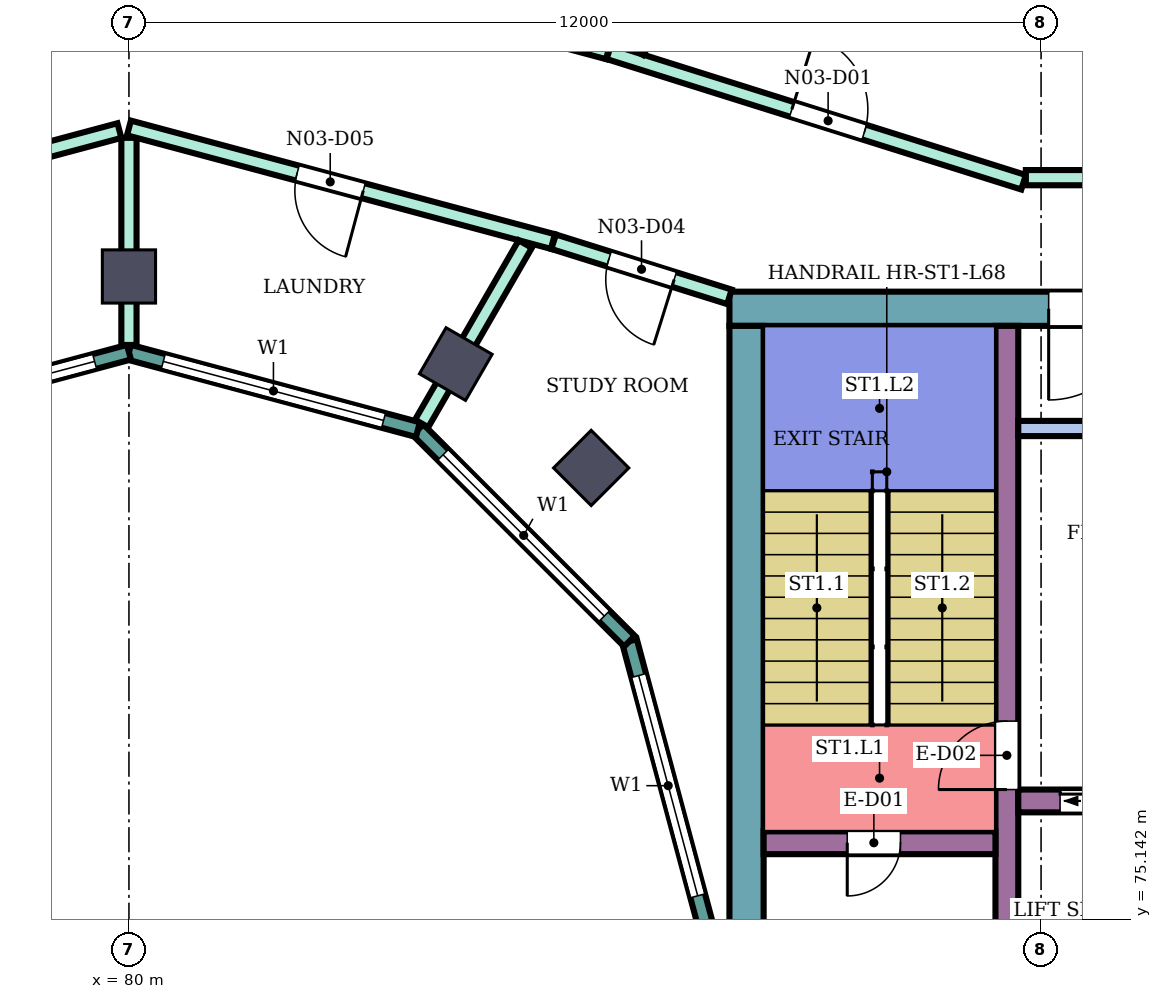
"""IFC4 building model, lengths in metres.
Left out: names, types, materials, properties, quantities, classifications, styles, units other than length and angle.
Written with IfcOpenShell. Run it as: python <this file> out.ifc"""

import sys

from ifc_helpers import new_model, si_unit, direction, frame, frame_2d, origin, origin_2d, place, context, subcontext, project, spatial, rectangle, extrude, element, fill, save


model = new_model("IFC4")
c1 = context("Model", 3, precision=1e-05, world=origin(), true_north=direction((0.0, 1.0)))
c2 = subcontext(c1, "Body", "Model", "MODEL_VIEW")
j1 = project(units=[si_unit("LENGTHUNIT", "METRE"), si_unit("PLANEANGLEUNIT", "RADIAN")], contexts=[c1])
p1 = place(None, origin())
s1 = spatial("IfcSite", under=j1, at=p1, CompositionType="ELEMENT")
p2 = place(p1, origin())
s2 = spatial("IfcBuilding", under=s1, at=p2, CompositionType="ELEMENT")
p3 = place(p2, frame((0.0, 0.0, 296.7)))
s3 = spatial("IfcBuildingStorey", under=s2, at=p3, CompositionType="ELEMENT", Elevation=296.7)
for number, where, z_axis, x_axis in (
    (1, (86.081, 81.081, 0.0), (0.0, 0.0, 1.0), (0.707, 0.707, 0.0)),
    (2, (84.3, 82.448, 0.0), (0.0, 0.0, 1.0), (0.5, 0.866, 0.0)),
    (3, (80.0, 83.6, 0.0), (0.0, 0.0, 1.0), (0.0, 1.0, 0.0)),
):
    element("IfcColumn", number, at=place(p3, frame(where, z_axis=z_axis, x_axis=x_axis)), inside=s3, PredefinedType="COLUMN", context=c2, shape_type="SweptSolid", body=[
        extrude(rectangle(XDim=0.7, YDim=0.7, at=origin_2d()), origin(), (0.0, 0.0, 1.0), 4.2),
    ])
p4 = place(p3, frame((87.9, 83.175, 0.0), z_axis=(0.0, 0.0, 1.0), x_axis=(1.0, 0.0, 0.0)))
e4 = element("IfcWall", 4, at=p4, inside=s3, PredefinedType="SHEAR", context=c2, shape_type="SweptSolid", body=[
    extrude(rectangle(XDim=12.0, YDim=0.45, at=frame_2d((6.0, 0.0))), origin(), (0.0, 0.0, 1.0), 3.88),
])
p5 = place(p4, frame((4.2, 0.0, 0.0)))
e5 = element("IfcOpeningElement", 5, at=p5, cuts=e4, PredefinedType="OPENING", context=c2, shape_type="SweptSolid", body=[
    extrude(rectangle(XDim=2.4, YDim=2.4, at=frame_2d((1.2, 1.2))), frame((0.0, 0.235, 0.0), z_axis=(0.0, -1.0, 0.0), x_axis=(1.0, 0.0, 0.0)), (0.0, 0.0, 1.0), 0.47),
])
p6 = place(p3, frame((88.125, 75.0, 0.0), z_axis=(0.0, 0.0, 1.0), x_axis=(0.0, 1.0, 0.0)))
e6 = element("IfcWall", 6, at=p6, inside=s3, PredefinedType="SHEAR", context=c2, shape_type="SweptSolid", body=[
    extrude(rectangle(XDim=7.95, YDim=0.45, at=frame_2d((3.975, 0.0))), origin(), (0.0, 0.0, 1.0), 3.88),
])
p7 = place(p3, frame((91.55, 75.0, 0.0), z_axis=(0.0, 0.0, 1.0), x_axis=(0.0, 1.0, 0.0)))
e7 = element("IfcWall", 7, at=p7, inside=s3, PredefinedType="SHEAR", context=c2, shape_type="SweptSolid", body=[
    extrude(rectangle(XDim=7.95, YDim=0.3, at=frame_2d((3.975, 0.0))), origin(), (0.0, 0.0, 1.0), 3.88),
])
p8 = place(p7, frame((1.85, 0.0, 0.0)))
e8 = element("IfcOpeningElement", 8, at=p8, cuts=e7, PredefinedType="OPENING", context=c2, shape_type="SweptSolid", body=[
    extrude(rectangle(XDim=0.9, YDim=2.1, at=frame_2d((0.45, 1.05))), frame((0.0, 0.16, 0.0), z_axis=(0.0, -1.0, 0.0), x_axis=(1.0, 0.0, 0.0)), (0.0, 0.0, 1.0), 0.32),
])
p9 = place(p3, frame((88.35, 76.15, 0.0), z_axis=(0.0, 0.0, 1.0), x_axis=(1.0, 0.0, 0.0)))
e9 = element("IfcWall", 9, at=p9, inside=s3, PredefinedType="SHEAR", context=c2, shape_type="SweptSolid", body=[
    extrude(rectangle(XDim=3.05, YDim=0.3, at=frame_2d((1.525, 0.0))), origin(), (0.0, 0.0, 1.0), 3.88),
])
p10 = place(p9, frame((1.1, 0.0, 0.0)))
e10 = element("IfcOpeningElement", 10, at=p10, cuts=e9, PredefinedType="OPENING", context=c2, shape_type="SweptSolid", body=[
    extrude(rectangle(XDim=0.7, YDim=2.0, at=frame_2d((0.35, 1.0))), frame((0.0, 0.16, 0.0), z_axis=(0.0, -1.0, 0.0), x_axis=(1.0, 0.0, 0.0)), (0.0, 0.0, 1.0), 0.32),
])
p11 = place(p3, frame((91.7, 76.7, 0.0), z_axis=(0.0, 0.0, 1.0), x_axis=(1.0, 0.0, 0.0)))
e11 = element("IfcWall", 11, at=p11, inside=s3, PredefinedType="SHEAR", context=c2, shape_type="SweptSolid", body=[
    extrude(rectangle(XDim=7.75, YDim=0.3, at=frame_2d((3.875, 0.0))), origin(), (0.0, 0.0, 1.0), 3.88),
])
p12 = place(p11, frame((0.55, 0.0, 0.0)))
e12 = element("IfcOpeningElement", 12, at=p12, cuts=e11, PredefinedType="OPENING", context=c2, shape_type="SweptSolid", body=[
    extrude(rectangle(XDim=1.1, YDim=2.1, at=frame_2d((0.55, 1.05))), frame((0.0, 0.16, 0.0), z_axis=(0.0, -1.0, 0.0), x_axis=(1.0, 0.0, 0.0)), (0.0, 0.0, 1.0), 0.32),
])
p13 = place(p11, frame((3.0, 0.0, 0.0)))
e13 = element("IfcOpeningElement", 13, at=p13, cuts=e11, PredefinedType="OPENING", context=c2, shape_type="SweptSolid", body=[
    extrude(rectangle(XDim=1.2, YDim=2.1, at=frame_2d((0.6, 1.05))), frame((0.0, 0.16, 0.0), z_axis=(0.0, -1.0, 0.0), x_axis=(1.0, 0.0, 0.0)), (0.0, 0.0, 1.0), 0.32),
])
p14 = place(p11, frame((5.5, 0.0, 0.0)))
e14 = element("IfcOpeningElement", 14, at=p14, cuts=e11, PredefinedType="OPENING", context=c2, shape_type="SweptSolid", body=[
    extrude(rectangle(XDim=1.2, YDim=2.1, at=frame_2d((0.6, 1.05))), frame((0.0, 0.16, 0.0), z_axis=(0.0, -1.0, 0.0), x_axis=(1.0, 0.0, 0.0)), (0.0, 0.0, 1.0), 0.32),
])
p15 = place(p3, frame((91.7, 81.6, 0.0), z_axis=(0.0, 0.0, 1.0), x_axis=(1.0, 0.0, 0.0)))
e15 = element("IfcWall", 15, at=p15, inside=s3, PredefinedType="SHEAR", context=c2, shape_type="SweptSolid", body=[
    extrude(rectangle(XDim=4.15, YDim=0.2, at=frame_2d((2.075, 0.0))), origin(), (0.0, 0.0, 1.0), 3.88),
])
p16 = place(p3, frame((87.604, 75.0, 0.0), z_axis=(0.0, 0.0, 1.0), x_axis=(-0.258789828301, 0.965933654434, 0.0)))
e16 = element("IfcWall", 16, at=p16, inside=s3, PredefinedType="NOTDEFINED", context=c2, shape_type="SweptSolid", body=[
    extrude(rectangle(XDim=3.936, YDim=0.2, at=frame_2d((1.968, 0.0))), origin(), (0.0, 0.0, 1.0), 4.2),
])
p17 = place(p16, frame((0.468, 0.0, 0.9)))
e17 = element("IfcOpeningElement", 17, at=p17, cuts=e16, PredefinedType="OPENING", context=c2, shape_type="SweptSolid", body=[
    extrude(rectangle(XDim=3.0, YDim=2.3, at=frame_2d((1.5, 1.15))), frame((0.0, 0.11, 0.0), z_axis=(0.0, -1.0, 0.0), x_axis=(1.0, 0.0, 0.0)), (0.0, 0.0, 1.0), 0.22),
])
p18 = place(p3, frame((86.585, 78.802, 0.0), z_axis=(0.0, 0.0, 1.0), x_axis=(-0.707106781187, 0.707106781187, 0.0)))
e18 = element("IfcWall", 18, at=p18, inside=s3, PredefinedType="NOTDEFINED", context=c2, shape_type="SweptSolid", body=[
    extrude(rectangle(XDim=3.936, YDim=0.2, at=frame_2d((1.968, 0.0))), origin(), (0.0, 0.0, 1.0), 4.2),
])
p19 = place(p18, frame((0.468, 0.0, 0.9)))
e19 = element("IfcOpeningElement", 19, at=p19, cuts=e18, PredefinedType="OPENING", context=c2, shape_type="SweptSolid", body=[
    extrude(rectangle(XDim=3.0, YDim=2.3, at=frame_2d((1.5, 1.15))), frame((0.0, 0.11, 0.0), z_axis=(0.0, -1.0, 0.0), x_axis=(1.0, 0.0, 0.0)), (0.0, 0.0, 1.0), 0.22),
])
p20 = place(p3, frame((83.802, 81.585, 0.0), z_axis=(0.0, 0.0, 1.0), x_axis=(-0.965933654434, 0.258789828301, 0.0)))
e20 = element("IfcWall", 20, at=p20, inside=s3, PredefinedType="NOTDEFINED", context=c2, shape_type="SweptSolid", body=[
    extrude(rectangle(XDim=3.936, YDim=0.2, at=frame_2d((1.968, 0.0))), origin(), (0.0, 0.0, 1.0), 4.2),
])
p21 = place(p20, frame((0.468, 0.0, 0.9)))
e21 = element("IfcOpeningElement", 21, at=p21, cuts=e20, PredefinedType="OPENING", context=c2, shape_type="SweptSolid", body=[
    extrude(rectangle(XDim=3.0, YDim=2.3, at=frame_2d((1.5, 1.15))), frame((0.0, 0.11, 0.0), z_axis=(0.0, -1.0, 0.0), x_axis=(1.0, 0.0, 0.0)), (0.0, 0.0, 1.0), 0.22),
])
p22 = place(p3, frame((80.0, 82.604, 0.0), z_axis=(0.0, 0.0, 1.0), x_axis=(-0.965933654434, -0.258789828301, 0.0)))
e22 = element("IfcWall", 22, at=p22, inside=s3, PredefinedType="NOTDEFINED", context=c2, shape_type="SweptSolid", body=[
    extrude(rectangle(XDim=3.936, YDim=0.2, at=frame_2d((1.968, 0.0))), origin(), (0.0, 0.0, 1.0), 4.2),
])
p23 = place(p22, frame((0.468, 0.0, 0.9)))
e23 = element("IfcOpeningElement", 23, at=p23, cuts=e22, PredefinedType="OPENING", context=c2, shape_type="SweptSolid", body=[
    extrude(rectangle(XDim=3.0, YDim=2.3, at=frame_2d((1.5, 1.15))), frame((0.0, 0.11, 0.0), z_axis=(0.0, -1.0, 0.0), x_axis=(1.0, 0.0, 0.0)), (0.0, 0.0, 1.0), 0.22),
])
p24 = place(p3, frame((74.413, 84.057, 0.0), z_axis=(0.0, 0.0, 1.0), x_axis=(0.965972135939, 0.258646153246, 0.0)))
e24 = element("IfcWall", 24, at=p24, inside=s3, PredefinedType="PARTITIONING", context=c2, shape_type="SweptSolid", body=[
    extrude(rectangle(XDim=5.654, YDim=0.2, at=frame_2d((2.827, 0.0))), origin(), (0.0, 0.0, 1.0), 3.75),
])
p25 = place(p24, frame((2.593, 0.0, 0.0)))
e25 = element("IfcOpeningElement", 25, at=p25, cuts=e24, PredefinedType="OPENING", context=c2, shape_type="SweptSolid", body=[
    extrude(rectangle(XDim=0.9, YDim=2.1, at=frame_2d((0.45, 1.05))), frame((0.0, 0.11, 0.0), z_axis=(0.0, -1.0, 0.0), x_axis=(1.0, 0.0, 0.0)), (0.0, 0.0, 1.0), 0.22),
])
p26 = place(p3, frame((80.0, 82.699, 0.0), z_axis=(0.0, 0.0, 1.0), x_axis=(0.0, 1.0, 0.0)))
e26 = element("IfcWall", 26, at=p26, inside=s3, PredefinedType="PARTITIONING", context=c2, shape_type="SweptSolid", body=[
    extrude(rectangle(XDim=2.725, YDim=0.2, at=frame_2d((1.363, 0.0))), origin(), (0.0, 0.0, 1.0), 3.75),
])
p27 = place(p3, frame((80.0, 85.554, 0.0), z_axis=(0.0, 0.0, 1.0), x_axis=(0.965928989968, -0.258807237802, 0.0)))
e27 = element("IfcWall", 27, at=p27, inside=s3, PredefinedType="PARTITIONING", context=c2, shape_type="SweptSolid", body=[
    extrude(rectangle(XDim=5.774, YDim=0.2, at=frame_2d((2.887, 0.0))), origin(), (0.0, 0.0, 1.0), 3.75),
])
p28 = place(p27, frame((2.292, 0.0, 0.0)))
e28 = element("IfcOpeningElement", 28, at=p28, cuts=e27, PredefinedType="OPENING", context=c2, shape_type="SweptSolid", body=[
    extrude(rectangle(XDim=0.9, YDim=2.1, at=frame_2d((0.45, 1.05))), frame((0.0, 0.11, 0.0), z_axis=(0.0, -1.0, 0.0), x_axis=(1.0, 0.0, 0.0)), (0.0, 0.0, 1.0), 0.22),
])
p29 = place(p3, frame((80.0, 88.246, 0.0), z_axis=(0.0, 0.0, 1.0), x_axis=(0.965856994925, -0.259075790752, 0.0)))
e29 = element("IfcWall", 29, at=p29, inside=s3, PredefinedType="PARTITIONING", context=c2, shape_type="SweptSolid", body=[
    extrude(rectangle(XDim=6.526, YDim=0.2, at=frame_2d((3.263, 0.0))), origin(), (0.0, 0.0, 1.0), 3.75),
])
p30 = place(p29, frame((2.768, 0.0, 0.0)))
e30 = element("IfcOpeningElement", 30, at=p30, cuts=e29, PredefinedType="OPENING", context=c2, shape_type="SweptSolid", body=[
    extrude(rectangle(XDim=1.0, YDim=2.1, at=frame_2d((0.5, 1.05))), frame((0.0, 0.11, 0.0), z_axis=(0.0, -1.0, 0.0), x_axis=(1.0, 0.0, 0.0)), (0.0, 0.0, 1.0), 0.22),
])
p31 = place(p3, frame((83.851, 81.666, 0.0), z_axis=(0.0, 0.0, 1.0), x_axis=(0.500146274735, 0.865940935554, 0.0)))
e31 = element("IfcWall", 31, at=p31, inside=s3, PredefinedType="PARTITIONING", context=c2, shape_type="SweptSolid", body=[
    extrude(rectangle(XDim=2.726, YDim=0.2, at=frame_2d((1.363, 0.0))), origin(), (0.0, 0.0, 1.0), 3.75),
])
p32 = place(p3, frame((85.587, 84.057, 0.0), z_axis=(0.0, 0.0, 1.0), x_axis=(0.954239513179, -0.299043393987, 0.0)))
e32 = element("IfcWall", 32, at=p32, inside=s3, PredefinedType="PARTITIONING", context=c2, shape_type="SweptSolid", body=[
    extrude(rectangle(XDim=2.424, YDim=0.2, at=frame_2d((1.212, 0.0))), origin(), (0.0, 0.0, 1.0), 3.75),
])
p33 = place(p32, frame((0.762, 0.0, 0.0)))
e33 = element("IfcOpeningElement", 33, at=p33, cuts=e32, PredefinedType="OPENING", context=c2, shape_type="SweptSolid", body=[
    extrude(rectangle(XDim=0.9, YDim=2.1, at=frame_2d((0.45, 1.05))), frame((0.0, 0.11, 0.0), z_axis=(0.0, -1.0, 0.0), x_axis=(1.0, 0.0, 0.0)), (0.0, 0.0, 1.0), 0.22),
])
p34 = place(p3, frame((86.314, 86.556, 0.0), z_axis=(0.0, 0.0, 1.0), x_axis=(0.953912400139, -0.300085209334, 0.0)))
e34 = element("IfcWall", 34, at=p34, inside=s3, PredefinedType="PARTITIONING", context=c2, shape_type="SweptSolid", body=[
    extrude(rectangle(XDim=5.719, YDim=0.2, at=frame_2d((2.86, 0.0))), origin(), (0.0, 0.0, 1.0), 3.75),
])
p35 = place(p34, frame((2.524, 0.0, 0.0)))
e35 = element("IfcOpeningElement", 35, at=p35, cuts=e34, PredefinedType="OPENING", context=c2, shape_type="SweptSolid", body=[
    extrude(rectangle(XDim=1.0, YDim=2.1, at=frame_2d((0.5, 1.05))), frame((0.0, 0.11, 0.0), z_axis=(0.0, -1.0, 0.0), x_axis=(1.0, 0.0, 0.0)), (0.0, 0.0, 1.0), 0.22),
])
p36 = place(p3, frame((86.679, 86.563, 0.0), z_axis=(0.0, 0.0, 1.0), x_axis=(0.500152516677, 0.865937330331, 0.0)))
e36 = element("IfcWall", 36, at=p36, inside=s3, PredefinedType="PARTITIONING", context=c2, shape_type="SweptSolid", body=[
    extrude(rectangle(XDim=8.943, YDim=0.2, at=frame_2d((4.472, 0.0))), origin(), (0.0, 0.0, 1.0), 3.75),
])
p37 = place(p3, frame((91.8, 84.9, 0.0), z_axis=(0.0, 0.0, 1.0), x_axis=(1.0, 0.0, 0.0)))
e37 = element("IfcWall", 37, at=p37, inside=s3, PredefinedType="PARTITIONING", context=c2, shape_type="SweptSolid", body=[
    extrude(rectangle(XDim=2.9, YDim=0.2, at=frame_2d((1.45, 0.0))), origin(), (0.0, 0.0, 1.0), 3.75),
])
p38 = place(p17, origin())
e38 = element("IfcWindow", 38, at=p38, inside=s3, PartitioningType="SINGLE_PANEL", PredefinedType="WINDOW", context=c2, shape_type="SweptSolid", body=[
    extrude(rectangle(XDim=3.0, YDim=2.3, at=frame_2d((1.5, 1.15))), frame((0.0, 0.03, 0.0), z_axis=(0.0, -1.0, 0.0), x_axis=(1.0, 0.0, 0.0)), (0.0, 0.0, 1.0), 0.06),
])
fill(e17, e38)
p39 = place(p19, origin())
e39 = element("IfcWindow", 39, at=p39, inside=s3, PartitioningType="SINGLE_PANEL", PredefinedType="WINDOW", context=c2, shape_type="SweptSolid", body=[
    extrude(rectangle(XDim=3.0, YDim=2.3, at=frame_2d((1.5, 1.15))), frame((0.0, 0.03, 0.0), z_axis=(0.0, -1.0, 0.0), x_axis=(1.0, 0.0, 0.0)), (0.0, 0.0, 1.0), 0.06),
])
fill(e19, e39)
p40 = place(p21, origin())
e40 = element("IfcWindow", 40, at=p40, inside=s3, PartitioningType="SINGLE_PANEL", PredefinedType="WINDOW", context=c2, shape_type="SweptSolid", body=[
    extrude(rectangle(XDim=3.0, YDim=2.3, at=frame_2d((1.5, 1.15))), frame((0.0, 0.03, 0.0), z_axis=(0.0, -1.0, 0.0), x_axis=(1.0, 0.0, 0.0)), (0.0, 0.0, 1.0), 0.06),
])
fill(e21, e40)
p41 = place(p23, origin())
e41 = element("IfcWindow", 41, at=p41, inside=s3, PartitioningType="SINGLE_PANEL", PredefinedType="WINDOW", context=c2, shape_type="SweptSolid", body=[
    extrude(rectangle(XDim=3.0, YDim=2.3, at=frame_2d((1.5, 1.15))), frame((0.0, 0.03, 0.0), z_axis=(0.0, -1.0, 0.0), x_axis=(1.0, 0.0, 0.0)), (0.0, 0.0, 1.0), 0.06),
])
fill(e23, e41)
p42 = place(p35, origin())
e42 = element("IfcDoor", 42, at=p42, inside=s3, OperationType="SINGLE_SWING_LEFT", PredefinedType="DOOR", context=c2, shape_type="SweptSolid", body=[
    extrude(rectangle(XDim=1.0, YDim=2.1, at=frame_2d((0.5, 1.05))), frame((0.0, 0.025, 0.0), z_axis=(0.0, -1.0, 0.0), x_axis=(1.0, 0.0, 0.0)), (0.0, 0.0, 1.0), 0.05),
])
fill(e35, e42)
p43 = place(p33, frame((0.9, 0.0, 0.0), z_axis=(0.0, 0.0, 1.0), x_axis=(-1.0, 0.0, 0.0)))
e43 = element("IfcDoor", 43, at=p43, inside=s3, OperationType="SINGLE_SWING_LEFT", PredefinedType="DOOR", context=c2, shape_type="SweptSolid", body=[
    extrude(rectangle(XDim=0.9, YDim=2.1, at=frame_2d((0.45, 1.05))), frame((0.0, 0.025, 0.0), z_axis=(0.0, -1.0, 0.0), x_axis=(1.0, 0.0, 0.0)), (0.0, 0.0, 1.0), 0.05),
])
fill(e33, e43)
p44 = place(p28, frame((0.9, 0.0, 0.0), z_axis=(0.0, 0.0, 1.0), x_axis=(-1.0, 0.0, 0.0)))
e44 = element("IfcDoor", 44, at=p44, inside=s3, OperationType="SINGLE_SWING_LEFT", PredefinedType="DOOR", context=c2, shape_type="SweptSolid", body=[
    extrude(rectangle(XDim=0.9, YDim=2.1, at=frame_2d((0.45, 1.05))), frame((0.0, 0.025, 0.0), z_axis=(0.0, -1.0, 0.0), x_axis=(1.0, 0.0, 0.0)), (0.0, 0.0, 1.0), 0.05),
])
fill(e28, e44)
p45 = place(p10, frame((0.7, 0.0, 0.0), z_axis=(0.0, 0.0, 1.0), x_axis=(-1.0, 0.0, 0.0)))
e45 = element("IfcDoor", 45, at=p45, inside=s3, OperationType="SINGLE_SWING_RIGHT", PredefinedType="DOOR", context=c2, shape_type="SweptSolid", body=[
    extrude(rectangle(XDim=0.7, YDim=2.0, at=frame_2d((0.35, 1.0))), frame((0.0, 0.025, 0.0), z_axis=(0.0, -1.0, 0.0), x_axis=(1.0, 0.0, 0.0)), (0.0, 0.0, 1.0), 0.05),
])
fill(e10, e45)
p46 = place(p8, origin())
e46 = element("IfcDoor", 46, at=p46, inside=s3, OperationType="SINGLE_SWING_LEFT", PredefinedType="DOOR", context=c2, shape_type="SweptSolid", body=[
    extrude(rectangle(XDim=0.9, YDim=2.1, at=frame_2d((0.45, 1.05))), frame((0.0, 0.025, 0.0), z_axis=(0.0, -1.0, 0.0), x_axis=(1.0, 0.0, 0.0)), (0.0, 0.0, 1.0), 0.05),
])
fill(e8, e46)
p47 = place(p12, origin())
e47 = element("IfcDoor", 47, at=p47, inside=s3, OperationType="DOUBLE_DOOR_SLIDING", PredefinedType="DOOR", context=c2, shape_type="SweptSolid", body=[
    extrude(rectangle(XDim=1.1, YDim=2.1, at=frame_2d((0.55, 1.05))), frame((0.0, 0.025, 0.0), z_axis=(0.0, -1.0, 0.0), x_axis=(1.0, 0.0, 0.0)), (0.0, 0.0, 1.0), 0.05),
])
fill(e12, e47)
p48 = place(p5, frame((2.4, 0.0, 0.0), z_axis=(0.0, 0.0, 1.0), x_axis=(-1.0, 0.0, 0.0)))
e48 = element("IfcDoor", 48, at=p48, inside=s3, OperationType="DOUBLE_DOOR_SINGLE_SWING", PredefinedType="DOOR", context=c2, shape_type="SweptSolid", body=[
    extrude(rectangle(XDim=2.4, YDim=2.4, at=frame_2d((1.2, 1.2))), frame((0.0, 0.025, 0.0), z_axis=(0.0, -1.0, 0.0), x_axis=(1.0, 0.0, 0.0)), (0.0, 0.0, 1.0), 0.05),
])
fill(e5, e48)
save(model, sys.argv[1])
